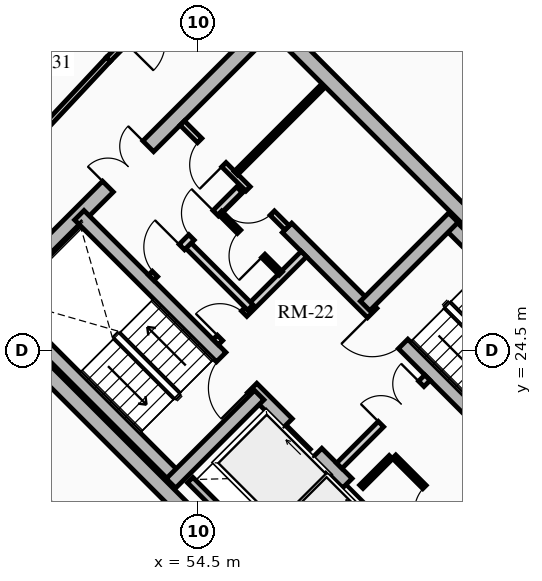
"""IFC4 building model, lengths in metres.
Left out: names, types, materials, properties, quantities, classifications, styles, units other than length and angle.
Written with IfcOpenShell. Run it as: python <this file> out.ifc"""

import sys

from ifc_helpers import new_model, si_unit, direction, frame, frame_2d, origin, place, context, subcontext, project, spatial, rectangle, extrude, source, transform, mapped, element, fill, save


model = new_model("IFC4")
c1 = context("Model", 3, precision=1e-05, world=origin(), true_north=direction((0.0, 1.0)))
c2 = subcontext(c1, "Body", "Model", "MODEL_VIEW")
j1 = project(units=[si_unit("LENGTHUNIT", "METRE"), si_unit("PLANEANGLEUNIT", "RADIAN")], contexts=[c1])
p1 = place(None, origin())
s1 = spatial("IfcSite", under=j1, at=p1, CompositionType="ELEMENT")
p2 = place(p1, origin())
s2 = spatial("IfcBuilding", under=s1, at=p2, CompositionType="ELEMENT")
p3 = place(p2, frame((0.0, 0.0, 166.15)))
s3 = spatial("IfcBuildingStorey", under=s2, at=p3, CompositionType="ELEMENT", Elevation=166.15)
for number, where, z_axis, x_axis in (
    (1, (58.702, 15.732, 0.0), (0.0, 0.0, 1.0), (-0.707, 0.707, 0.0)),
    (2, (66.268, 23.298, 0.0), (0.0, 0.0, 1.0), (-0.707, 0.707, 0.0)),
):
    element("IfcWall", number, at=place(p3, frame(where, z_axis=z_axis, x_axis=x_axis)), inside=s3, PredefinedType="SHEAR", context=c2, shape_type="SweptSolid", body=[
        extrude(rectangle(XDim=14.1, YDim=0.4, at=frame_2d((7.05, 0.0))), origin(), (0.0, 0.0, 1.0), 2.91),
    ])
p4 = place(p3, frame((58.561, 15.873, 0.0), z_axis=(0.0, 0.0, 1.0), x_axis=(0.707106781187, 0.707106781187, 0.0)))
e3 = element("IfcWall", 3, at=p4, inside=s3, PredefinedType="SHEAR", context=c2, shape_type="SweptSolid", body=[
    extrude(rectangle(XDim=10.7, YDim=0.4, at=frame_2d((5.35, 0.0))), origin(), (0.0, 0.0, 1.0), 2.91),
])
m1 = source(origin(), c2, "Body", "SweptSolid", [
    extrude(rectangle(XDim=1.5, YDim=2.02, at=frame_2d((0.75, 1.01))), frame((0.0, 0.21, 0.0), z_axis=(0.0, -1.0, 0.0), x_axis=(1.0, 0.0, 0.0)), (0.0, 0.0, 1.0), 0.42),
])
p5 = place(p4, frame((5.45, 0.0, 0.0)))
e4 = element("IfcOpeningElement", 4, at=p5, cuts=e3, PredefinedType="OPENING", context=c2, shape_type="MappedRepresentation", body=[
    mapped(m1, transform((0.0, 0.0, 0.0), x_axis=(1.0, 0.0, 0.0), y_axis=(0.0, 1.0, 0.0), z_axis=(0.0, 0.0, 1.0), scale=1.0)),
])
p6 = place(p3, frame((48.873, 25.561, 0.0), z_axis=(0.0, 0.0, 1.0), x_axis=(0.707106781187, 0.707106781187, 0.0)))
e5 = element("IfcWall", 5, at=p6, inside=s3, PredefinedType="SHEAR", context=c2, shape_type="SweptSolid", body=[
    extrude(rectangle(XDim=10.7, YDim=0.4, at=frame_2d((5.35, 0.0))), origin(), (0.0, 0.0, 1.0), 2.91),
])
p7 = place(p6, frame((4.6, 0.0, 0.0)))
e6 = element("IfcOpeningElement", 6, at=p7, cuts=e5, PredefinedType="OPENING", context=c2, shape_type="MappedRepresentation", body=[
    mapped(m1, transform((0.0, 0.0, 0.0), x_axis=(1.0, 0.0, 0.0), y_axis=(0.0, 1.0, 0.0), z_axis=(0.0, 0.0, 1.0), scale=1.0)),
])
p8 = place(p3, frame((61.06, 18.373, 0.0), z_axis=(0.0, 0.0, 1.0), x_axis=(-0.707106781187, 0.707106781187, 0.0)))
e7 = element("IfcWall", 7, at=p8, inside=s3, PredefinedType="SHEAR", context=c2, shape_type="SweptSolid", body=[
    extrude(rectangle(XDim=13.7, YDim=0.35, at=frame_2d((6.85, 0.0))), origin(), (0.0, 0.0, 1.0), 2.91),
])
m2 = source(origin(), c2, "Body", "SweptSolid", [
    extrude(rectangle(XDim=1.1, YDim=2.015, at=frame_2d((0.55, 1.007))), frame((0.0, 0.185, 0.0), z_axis=(0.0, -1.0, 0.0), x_axis=(1.0, 0.0, 0.0)), (0.0, 0.0, 1.0), 0.37),
])
p9 = place(p8, frame((4.85, 0.0, 0.0)))
e8 = element("IfcOpeningElement", 8, at=p9, cuts=e7, PredefinedType="OPENING", context=c2, shape_type="MappedRepresentation", body=[
    mapped(m2, transform((0.0, 0.0, 0.0), x_axis=(1.0, 0.0, 0.0), y_axis=(0.0, 1.0, 0.0), z_axis=(0.0, 0.0, 1.0), scale=1.0)),
])
p10 = place(p8, frame((0.625, 0.0, 0.0)))
e9 = element("IfcOpeningElement", 9, at=p10, cuts=e7, PredefinedType="OPENING", context=c2, shape_type="MappedRepresentation", body=[
    mapped(m2, transform((0.0, 0.0, 0.0), x_axis=(1.0, 0.0, 0.0), y_axis=(0.0, 1.0, 0.0), z_axis=(0.0, 0.0, 1.0), scale=1.0)),
])
p11 = place(p8, frame((2.625, 0.0, 0.0)))
e10 = element("IfcOpeningElement", 10, at=p11, cuts=e7, PredefinedType="OPENING", context=c2, shape_type="MappedRepresentation", body=[
    mapped(m2, transform((0.0, 0.0, 0.0), x_axis=(1.0, 0.0, 0.0), y_axis=(0.0, 1.0, 0.0), z_axis=(0.0, 0.0, 1.0), scale=1.0)),
])
m3 = source(origin(), c2, "Body", "SweptSolid", [
    extrude(rectangle(XDim=1.15, YDim=2.02, at=frame_2d((0.575, 1.01))), frame((0.0, 0.185, 0.0), z_axis=(0.0, -1.0, 0.0), x_axis=(1.0, 0.0, 0.0)), (0.0, 0.0, 1.0), 0.37),
])
p12 = place(p8, frame((7.27, 0.0, 0.0)))
e11 = element("IfcOpeningElement", 11, at=p12, cuts=e7, PredefinedType="OPENING", context=c2, shape_type="MappedRepresentation", body=[
    mapped(m3, transform((0.0, 0.0, 0.0), x_axis=(1.0, 0.0, 0.0), y_axis=(0.0, 1.0, 0.0), z_axis=(0.0, 0.0, 1.0), scale=1.0)),
])
p13 = place(p3, frame((63.627, 20.94, 0.0), z_axis=(0.0, 0.0, 1.0), x_axis=(-0.707119496762, 0.707094065383, 0.0)))
e12 = element("IfcWall", 12, at=p13, inside=s3, PredefinedType="SHEAR", context=c2, shape_type="SweptSolid", body=[
    extrude(rectangle(XDim=9.6, YDim=0.35, at=frame_2d((4.8, 0.0))), origin(), (0.0, 0.0, 1.0), 2.91),
])
p14 = place(p13, frame((5.28, 0.0, 0.0)))
e13 = element("IfcOpeningElement", 13, at=p14, cuts=e12, PredefinedType="OPENING", context=c2, shape_type="MappedRepresentation", body=[
    mapped(m3, transform((0.0, 0.0, 0.0), x_axis=(1.0, 0.0, 0.0), y_axis=(0.0, 1.0, 0.0), z_axis=(0.0, 0.0, 1.0), scale=1.0)),
])
p15 = place(p3, frame((53.922, 21.141, 0.0), z_axis=(0.0, 0.0, 1.0), x_axis=(-0.707106781187, 0.707106781187, 0.0)))
e14 = element("IfcWall", 14, at=p15, inside=s3, PredefinedType="SHEAR", context=c2, shape_type="SweptSolid", body=[
    extrude(rectangle(XDim=6.695, YDim=0.35, at=frame_2d((3.348, 0.0))), origin(), (0.0, 0.0, 1.0), 2.91),
])
p16 = place(p3, frame((53.784, 21.003, 0.0), z_axis=(0.0, 0.0, 1.0), x_axis=(0.707106781187, 0.707106781187, 0.0)))
e15 = element("IfcWall", 15, at=p16, inside=s3, PredefinedType="SHEAR", context=c2, shape_type="SweptSolid", body=[
    extrude(rectangle(XDim=3.285, YDim=0.35, at=frame_2d((1.643, 0.0))), origin(), (0.0, 0.0, 1.0), 2.91),
])
p17 = place(p3, frame((65.812, 23.125, 0.0), z_axis=(0.0, 0.0, 1.0), x_axis=(-0.707106781187, 0.707106781187, 0.0)))
e16 = element("IfcWall", 16, at=p17, inside=s3, PredefinedType="SHEAR", context=c2, shape_type="SweptSolid", body=[
    extrude(rectangle(XDim=6.695, YDim=0.35, at=frame_2d((3.348, 0.0))), origin(), (0.0, 0.0, 1.0), 2.91),
])
p18 = place(p3, frame((58.893, 25.674, 0.0), z_axis=(0.0, 0.0, 1.0), x_axis=(0.707106781187, 0.707106781187, 0.0)))
e17 = element("IfcWall", 17, at=p18, inside=s3, PredefinedType="SHEAR", context=c2, shape_type="SweptSolid", body=[
    extrude(rectangle(XDim=3.285, YDim=0.35, at=frame_2d((1.643, 0.0))), origin(), (0.0, 0.0, 1.0), 2.91),
])
p19 = place(p3, frame((55.888, 19.069, 0.0), z_axis=(0.0, 0.0, 1.0), x_axis=(0.707106781187, 0.707106781187, 0.0)))
e18 = element("IfcWall", 18, at=p19, inside=s3, PredefinedType="SHEAR", context=c2, shape_type="SweptSolid", body=[
    extrude(rectangle(XDim=2.97, YDim=0.2, at=frame_2d((1.485, 0.0))), origin(), (0.0, 0.0, 1.0), 2.91),
])
p20 = place(p3, frame((56.015, 19.366, 0.0), z_axis=(0.0, 0.0, 1.0), x_axis=(-0.707106781187, 0.707106781187, 0.0)))
e19 = element("IfcWall", 19, at=p20, inside=s3, PredefinedType="SHEAR", context=c2, shape_type="SweptSolid", body=[
    extrude(rectangle(XDim=2.44, YDim=0.2, at=frame_2d((1.22, 0.0))), origin(), (0.0, 0.0, 1.0), 2.91),
])
p21 = place(p3, frame((58.214, 21.467, 0.0), z_axis=(0.0, 0.0, 1.0), x_axis=(0.707106781187, 0.707106781187, 0.0)))
e20 = element("IfcWall", 20, at=p21, inside=s3, PredefinedType="PARTITIONING", context=c2, shape_type="SweptSolid", body=[
    extrude(rectangle(XDim=3.28, YDim=0.2, at=frame_2d((1.64, 0.0))), origin(), (0.0, 0.0, 1.0), 2.675),
])
m4 = source(origin(), c2, "Body", "SweptSolid", [
    extrude(rectangle(XDim=1.5, YDim=2.02, at=frame_2d((0.75, 1.01))), frame((0.0, 0.11, 0.0), z_axis=(0.0, -1.0, 0.0), x_axis=(1.0, 0.0, 0.0)), (0.0, 0.0, 1.0), 0.22),
])
p22 = place(p21, frame((1.55, 0.0, 0.0)))
e21 = element("IfcOpeningElement", 21, at=p22, cuts=e20, PredefinedType="OPENING", context=c2, shape_type="MappedRepresentation", body=[
    mapped(m4, transform((0.0, 0.0, 0.0), x_axis=(1.0, 0.0, 0.0), y_axis=(0.0, 1.0, 0.0), z_axis=(0.0, 0.0, 1.0), scale=1.0)),
])
p23 = place(p3, frame((54.961, 24.719, 0.0), z_axis=(0.0, 0.0, 1.0), x_axis=(0.707106781187, 0.707106781187, 0.0)))
e22 = element("IfcWall", 22, at=p23, inside=s3, PredefinedType="PARTITIONING", context=c2, shape_type="SweptSolid", body=[
    extrude(rectangle(XDim=3.28, YDim=0.2, at=frame_2d((1.64, 0.0))), origin(), (0.0, 0.0, 1.0), 2.675),
])
m5 = source(origin(), c2, "Body", "SweptSolid", [
    extrude(rectangle(XDim=0.9, YDim=2.005, at=frame_2d((0.45, 1.002))), frame((0.0, 0.11, 0.0), z_axis=(0.0, -1.0, 0.0), x_axis=(1.0, 0.0, 0.0)), (0.0, 0.0, 1.0), 0.22),
])
p24 = place(p23, frame((0.16, 0.0, 0.0)))
e23 = element("IfcOpeningElement", 23, at=p24, cuts=e22, PredefinedType="OPENING", context=c2, shape_type="MappedRepresentation", body=[
    mapped(m5, transform((0.0, 0.0, 0.0), x_axis=(1.0, 0.0, 0.0), y_axis=(0.0, 1.0, 0.0), z_axis=(0.0, 0.0, 1.0), scale=1.0)),
])
p25 = place(p3, frame((55.874, 25.631, 0.0), z_axis=(0.0, 0.0, 1.0), x_axis=(-0.707157639372, 0.707055919343, 0.0)))
e24 = element("IfcWall", 24, at=p25, inside=s3, PredefinedType="PARTITIONING", context=c2, shape_type="SweptSolid", body=[
    extrude(rectangle(XDim=2.4, YDim=0.2, at=frame_2d((1.2, 0.0))), origin(), (0.0, 0.0, 1.0), 2.675),
])
p26 = place(p3, frame((53.264, 26.416, 0.0), z_axis=(0.0, 0.0, 1.0), x_axis=(0.707106781187, 0.707106781187, 0.0)))
e25 = element("IfcWall", 25, at=p26, inside=s3, PredefinedType="PARTITIONING", context=c2, shape_type="SweptSolid", body=[
    extrude(rectangle(XDim=3.28, YDim=0.2, at=frame_2d((1.64, 0.0))), origin(), (0.0, 0.0, 1.0), 2.675),
])
m6 = source(origin(), c2, "Body", "SweptSolid", [
    extrude(rectangle(XDim=1.0, YDim=2.015, at=frame_2d((0.5, 1.007))), frame((0.0, 0.11, 0.0), z_axis=(0.0, -1.0, 0.0), x_axis=(1.0, 0.0, 0.0)), (0.0, 0.0, 1.0), 0.22),
])
p27 = place(p26, frame((0.14, 0.0, 0.0)))
e26 = element("IfcOpeningElement", 26, at=p27, cuts=e25, PredefinedType="OPENING", context=c2, shape_type="MappedRepresentation", body=[
    mapped(m6, transform((0.0, 0.0, 0.0), x_axis=(1.0, 0.0, 0.0), y_axis=(0.0, 1.0, 0.0), z_axis=(0.0, 0.0, 1.0), scale=1.0)),
])
p28 = place(p26, frame((1.5, 0.0, 0.0)))
e27 = element("IfcOpeningElement", 27, at=p28, cuts=e25, PredefinedType="OPENING", context=c2, shape_type="MappedRepresentation", body=[
    mapped(m5, transform((0.0, 0.0, 0.0), x_axis=(1.0, 0.0, 0.0), y_axis=(0.0, 1.0, 0.0), z_axis=(0.0, 0.0, 1.0), scale=1.0)),
])
p29 = place(p3, frame((61.835, 19.529, 0.0), z_axis=(0.0, 0.0, 1.0), x_axis=(-0.707146413884, 0.707067146267, 0.0)))
e28 = element("IfcWall", 28, at=p29, inside=s3, PredefinedType="PARTITIONING", context=c2, shape_type="SweptSolid", body=[
    extrude(rectangle(XDim=3.08, YDim=0.125, at=frame_2d((1.54, 0.0))), origin(), (0.0, 0.0, 1.0), 2.675),
])
m7 = source(origin(), c2, "Body", "SweptSolid", [
    extrude(rectangle(XDim=0.9, YDim=2.005, at=frame_2d((0.45, 1.002))), frame((0.0, 0.073, 0.0), z_axis=(0.0, -1.0, 0.0), x_axis=(1.0, 0.0, 0.0)), (0.0, 0.0, 1.0), 0.145),
])
p30 = place(p29, frame((1.05, 0.0, 0.0)))
e29 = element("IfcOpeningElement", 29, at=p30, cuts=e28, PredefinedType="OPENING", context=c2, shape_type="MappedRepresentation", body=[
    mapped(m7, transform((0.0, 0.0, 0.0), x_axis=(1.0, 0.0, 0.0), y_axis=(0.0, 1.0, 0.0), z_axis=(0.0, 0.0, 1.0), scale=1.0)),
])
p31 = place(p3, frame((58.794, 20.915, 0.0), z_axis=(0.0, 0.0, 1.0), x_axis=(0.707106781187, 0.707106781187, 0.0)))
e30 = element("IfcWall", 30, at=p31, inside=s3, PredefinedType="PARTITIONING", context=c2, shape_type="SweptSolid", body=[
    extrude(rectangle(XDim=1.1, YDim=0.125, at=frame_2d((0.55, 0.0))), origin(), (0.0, 0.0, 1.0), 2.675),
])
p32 = place(p3, frame((56.673, 26.529, 0.0), z_axis=(0.0, 0.0, 1.0), x_axis=(-0.707052764397, 0.70716079385, 0.0)))
e31 = element("IfcWall", 31, at=p32, inside=s3, PredefinedType="PARTITIONING", context=c2, shape_type="SweptSolid", body=[
    extrude(rectangle(XDim=2.26, YDim=0.125, at=frame_2d((1.13, 0.0))), origin(), (0.0, 0.0, 1.0), 2.675),
])
p33 = place(p32, frame((0.65, 0.0, 0.0)))
e32 = element("IfcOpeningElement", 32, at=p33, cuts=e31, PredefinedType="OPENING", context=c2, shape_type="MappedRepresentation", body=[
    mapped(m7, transform((0.0, 0.0, 0.0), x_axis=(1.0, 0.0, 0.0), y_axis=(0.0, 1.0, 0.0), z_axis=(0.0, 0.0, 1.0), scale=1.0)),
])
p34 = place(p3, frame((56.839, 27.728, 0.0), z_axis=(0.0, 0.0, 1.0), x_axis=(-0.707106781187, 0.707106781187, 0.0)))
e33 = element("IfcWall", 33, at=p34, inside=s3, PredefinedType="PARTITIONING", context=c2, shape_type="SweptSolid", body=[
    extrude(rectangle(XDim=3.9, YDim=0.16, at=frame_2d((1.95, 0.0))), origin(), (0.0, 0.0, 1.0), 2.675),
])
m8 = source(origin(), c2, "Body", "SweptSolid", [
    extrude(rectangle(XDim=0.9, YDim=2.005, at=frame_2d((0.45, 1.002))), frame((0.0, 0.09, 0.0), z_axis=(0.0, -1.0, 0.0), x_axis=(1.0, 0.0, 0.0)), (0.0, 0.0, 1.0), 0.18),
])
p35 = place(p34, frame((0.55, 0.0, 0.0)))
e34 = element("IfcOpeningElement", 34, at=p35, cuts=e33, PredefinedType="OPENING", context=c2, shape_type="MappedRepresentation", body=[
    mapped(m8, transform((0.0, 0.0, 0.0), x_axis=(1.0, 0.0, 0.0), y_axis=(0.0, 1.0, 0.0), z_axis=(0.0, 0.0, 1.0), scale=1.0)),
])
p36 = place(p34, frame((2.35, 0.0, 0.0)))
e35 = element("IfcOpeningElement", 35, at=p36, cuts=e33, PredefinedType="OPENING", context=c2, shape_type="MappedRepresentation", body=[
    mapped(m8, transform((0.0, 0.0, 0.0), x_axis=(1.0, 0.0, 0.0), y_axis=(0.0, 1.0, 0.0), z_axis=(0.0, 0.0, 1.0), scale=1.0)),
])
p37 = place(p3, frame((55.492, 29.167, 0.0), z_axis=(0.0, 0.0, 1.0), x_axis=(0.707144688645, 0.707068871696, 0.0)))
e36 = element("IfcWall", 36, at=p37, inside=s3, PredefinedType="PARTITIONING", context=c2, shape_type="SweptSolid", body=[
    extrude(rectangle(XDim=3.22, YDim=0.125, at=frame_2d((1.61, 0.0))), origin(), (0.0, 0.0, 1.0), 2.212),
])
p38 = place(p3, frame((54.488, 34.535, 0.0), z_axis=(0.0, 0.0, 1.0), x_axis=(-0.703666289339, -0.710530613871, 0.0)))
e37 = element("IfcWall", 37, at=p38, inside=s3, PredefinedType="PARTITIONING", context=c2, shape_type="SweptSolid", body=[
    extrude(rectangle(XDim=3.343, YDim=0.15, at=frame_2d((1.672, 0.0))), origin(), (0.0, 0.0, 1.0), 2.245),
])
m9 = source(origin(), c2, "Body", "SweptSolid", [
    extrude(rectangle(XDim=1.05, YDim=2.015, at=frame_2d((0.525, 1.007))), frame((0.0, 0.085, 0.0), z_axis=(0.0, -1.0, 0.0), x_axis=(1.0, 0.0, 0.0)), (0.0, 0.0, 1.0), 0.17),
])
p39 = place(p38, frame((1.66, 0.0, 0.0)))
e38 = element("IfcOpeningElement", 38, at=p39, cuts=e37, PredefinedType="OPENING", context=c2, shape_type="MappedRepresentation", body=[
    mapped(m9, transform((0.0, 0.0, 0.0), x_axis=(1.0, 0.0, 0.0), y_axis=(0.0, 1.0, 0.0), z_axis=(0.0, 0.0, 1.0), scale=1.0)),
])
p40 = place(p3, frame((52.135, 32.159, 0.0), z_axis=(0.0, 0.0, 1.0), x_axis=(-0.682546302454, -0.730842353047, 0.0)))
e39 = element("IfcWall", 39, at=p40, inside=s3, PredefinedType="PARTITIONING", context=c2, shape_type="SweptSolid", body=[
    extrude(rectangle(XDim=6.445, YDim=0.15, at=frame_2d((3.223, 0.0))), origin(), (0.0, 0.0, 1.0), 2.245),
])
p41 = place(p3, frame((47.844, 23.253, 0.0), z_axis=(0.0, 0.0, 1.0), x_axis=(0.696248411352, -0.717800912293, 0.0)))
e40 = element("IfcWall", 40, at=p41, inside=s3, PredefinedType="PARTITIONING", context=c2, shape_type="SweptSolid", body=[
    extrude(rectangle(XDim=5.947, YDim=0.15, at=frame_2d((2.974, 0.0))), origin(), (0.0, 0.0, 1.0), 2.675),
])
p42 = place(p3, frame((46.732, 21.959, 0.0), z_axis=(0.0, 0.0, 1.0), x_axis=(0.674328014222, -0.738431939474, 0.0)))
e41 = element("IfcWall", 41, at=p42, inside=s3, PredefinedType="PARTITIONING", context=c2, shape_type="SweptSolid", body=[
    extrude(rectangle(XDim=5.823, YDim=0.125, at=frame_2d((2.912, 0.0))), origin(), (0.0, 0.0, 1.0), 2.675),
])
p43 = place(p42, frame((2.462, 0.0, 0.0)))
e42 = element("IfcOpeningElement", 42, at=p43, cuts=e41, PredefinedType="OPENING", context=c2, shape_type="MappedRepresentation", body=[
    mapped(m7, transform((0.0, 0.0, 0.0), x_axis=(1.0, 0.0, 0.0), y_axis=(0.0, 1.0, 0.0), z_axis=(0.0, 0.0, 1.0), scale=1.0)),
])
m10 = source(origin(), c2, "Body", "SweptSolid", [
    extrude(rectangle(XDim=1.1, YDim=2.015, at=frame_2d((0.55, 1.007))), frame((0.0, 0.025, 0.0), z_axis=(0.0, -1.0, 0.0), x_axis=(1.0, 0.0, 0.0)), (0.0, 0.0, 1.0), 0.05),
])
p44 = place(p9, origin())
e43 = element("IfcDoor", 43, at=p44, inside=s3, OperationType="SLIDING_TO_RIGHT", PredefinedType="DOOR", context=c2, shape_type="MappedRepresentation", body=[
    mapped(m10, transform((0.0, 0.0, 0.0), x_axis=(1.0, 0.0, 0.0), y_axis=(0.0, 1.0, 0.0), z_axis=(0.0, 0.0, 1.0), scale=1.0)),
])
fill(e8, e43)
p45 = place(p11, origin())
e44 = element("IfcDoor", 44, at=p45, inside=s3, OperationType="SLIDING_TO_RIGHT", PredefinedType="DOOR", context=c2, shape_type="MappedRepresentation", body=[
    mapped(m10, transform((0.0, 0.0, 0.0), x_axis=(1.0, 0.0, 0.0), y_axis=(0.0, 1.0, 0.0), z_axis=(0.0, 0.0, 1.0), scale=1.0)),
])
fill(e10, e44)
m11 = source(origin(), c2, "Body", "SweptSolid", [
    extrude(rectangle(XDim=1.15, YDim=2.02, at=frame_2d((0.575, 1.01))), frame((0.0, 0.025, 0.0), z_axis=(0.0, -1.0, 0.0), x_axis=(1.0, 0.0, 0.0)), (0.0, 0.0, 1.0), 0.05),
])
p46 = place(p12, origin())
e45 = element("IfcDoor", 45, at=p46, inside=s3, OperationType="SINGLE_SWING_LEFT", PredefinedType="DOOR", context=c2, shape_type="MappedRepresentation", body=[
    mapped(m11, transform((0.0, 0.0, 0.0), x_axis=(1.0, 0.0, 0.0), y_axis=(0.0, 1.0, 0.0), z_axis=(0.0, 0.0, 1.0), scale=1.0)),
])
fill(e11, e45)
p47 = place(p14, origin())
e46 = element("IfcDoor", 46, at=p47, inside=s3, OperationType="SINGLE_SWING_RIGHT", PredefinedType="DOOR", context=c2, shape_type="MappedRepresentation", body=[
    mapped(m11, transform((0.0, 0.0, 0.0), x_axis=(1.0, 0.0, 0.0), y_axis=(0.0, 1.0, 0.0), z_axis=(0.0, 0.0, 1.0), scale=1.0)),
])
fill(e13, e46)
m12 = source(origin(), c2, "Body", "SweptSolid", [
    extrude(rectangle(XDim=1.5, YDim=2.02, at=frame_2d((0.75, 1.01))), frame((0.0, 0.025, 0.0), z_axis=(0.0, -1.0, 0.0), x_axis=(1.0, 0.0, 0.0)), (0.0, 0.0, 1.0), 0.05),
])
p48 = place(p7, origin())
e47 = element("IfcDoor", 47, at=p48, inside=s3, OperationType="DOUBLE_DOOR_SINGLE_SWING", PredefinedType="DOOR", context=c2, shape_type="MappedRepresentation", body=[
    mapped(m12, transform((0.0, 0.0, 0.0), x_axis=(1.0, 0.0, 0.0), y_axis=(0.0, 1.0, 0.0), z_axis=(0.0, 0.0, 1.0), scale=1.0)),
])
fill(e6, e47)
p49 = place(p22, origin())
e48 = element("IfcDoor", 48, at=p49, inside=s3, OperationType="DOUBLE_DOOR_SINGLE_SWING", PredefinedType="DOOR", context=c2, shape_type="MappedRepresentation", body=[
    mapped(m12, transform((0.0, 0.0, 0.0), x_axis=(1.0, 0.0, 0.0), y_axis=(0.0, 1.0, 0.0), z_axis=(0.0, 0.0, 1.0), scale=1.0)),
])
fill(e21, e48)
m13 = source(origin(), c2, "Body", "SweptSolid", [
    extrude(rectangle(XDim=0.9, YDim=2.005, at=frame_2d((0.45, 1.002))), frame((0.0, 0.025, 0.0), z_axis=(0.0, -1.0, 0.0), x_axis=(1.0, 0.0, 0.0)), (0.0, 0.0, 1.0), 0.05),
])
p50 = place(p24, origin())
e49 = element("IfcDoor", 49, at=p50, inside=s3, OperationType="SINGLE_SWING_LEFT", PredefinedType="DOOR", context=c2, shape_type="MappedRepresentation", body=[
    mapped(m13, transform((0.0, 0.0, 0.0), x_axis=(1.0, 0.0, 0.0), y_axis=(0.0, 1.0, 0.0), z_axis=(0.0, 0.0, 1.0), scale=1.0)),
])
fill(e23, e49)
m14 = source(origin(), c2, "Body", "SweptSolid", [
    extrude(rectangle(XDim=1.0, YDim=2.015, at=frame_2d((0.5, 1.007))), frame((0.0, 0.025, 0.0), z_axis=(0.0, -1.0, 0.0), x_axis=(1.0, 0.0, 0.0)), (0.0, 0.0, 1.0), 0.05),
])
p51 = place(p27, origin())
e50 = element("IfcDoor", 50, at=p51, inside=s3, OperationType="SINGLE_SWING_RIGHT", PredefinedType="DOOR", context=c2, shape_type="MappedRepresentation", body=[
    mapped(m14, transform((0.0, 0.0, 0.0), x_axis=(1.0, 0.0, 0.0), y_axis=(0.0, 1.0, 0.0), z_axis=(0.0, 0.0, 1.0), scale=1.0)),
])
fill(e26, e50)
p52 = place(p30, origin())
e51 = element("IfcDoor", 51, at=p52, inside=s3, OperationType="SINGLE_SWING_LEFT", PredefinedType="DOOR", context=c2, shape_type="MappedRepresentation", body=[
    mapped(m13, transform((0.0, 0.0, 0.0), x_axis=(1.0, 0.0, 0.0), y_axis=(0.0, 1.0, 0.0), z_axis=(0.0, 0.0, 1.0), scale=1.0)),
])
fill(e29, e51)
p53 = place(p28, origin())
e52 = element("IfcDoor", 52, at=p53, inside=s3, OperationType="SINGLE_SWING_RIGHT", PredefinedType="DOOR", context=c2, shape_type="MappedRepresentation", body=[
    mapped(m13, transform((0.0, 0.0, 0.0), x_axis=(1.0, 0.0, 0.0), y_axis=(0.0, 1.0, 0.0), z_axis=(0.0, 0.0, 1.0), scale=1.0)),
])
fill(e27, e52)
p54 = place(p33, origin())
e53 = element("IfcDoor", 53, at=p54, inside=s3, OperationType="SINGLE_SWING_LEFT", PredefinedType="DOOR", context=c2, shape_type="MappedRepresentation", body=[
    mapped(m13, transform((0.0, 0.0, 0.0), x_axis=(1.0, 0.0, 0.0), y_axis=(0.0, 1.0, 0.0), z_axis=(0.0, 0.0, 1.0), scale=1.0)),
])
fill(e32, e53)
p55 = place(p35, origin())
e54 = element("IfcDoor", 54, at=p55, inside=s3, OperationType="SINGLE_SWING_RIGHT", PredefinedType="DOOR", context=c2, shape_type="MappedRepresentation", body=[
    mapped(m13, transform((0.0, 0.0, 0.0), x_axis=(1.0, 0.0, 0.0), y_axis=(0.0, 1.0, 0.0), z_axis=(0.0, 0.0, 1.0), scale=1.0)),
])
fill(e34, e54)
p56 = place(p36, origin())
e55 = element("IfcDoor", 55, at=p56, inside=s3, OperationType="SINGLE_SWING_LEFT", PredefinedType="DOOR", context=c2, shape_type="MappedRepresentation", body=[
    mapped(m13, transform((0.0, 0.0, 0.0), x_axis=(1.0, 0.0, 0.0), y_axis=(0.0, 1.0, 0.0), z_axis=(0.0, 0.0, 1.0), scale=1.0)),
])
fill(e35, e55)
save(model, sys.argv[1])
